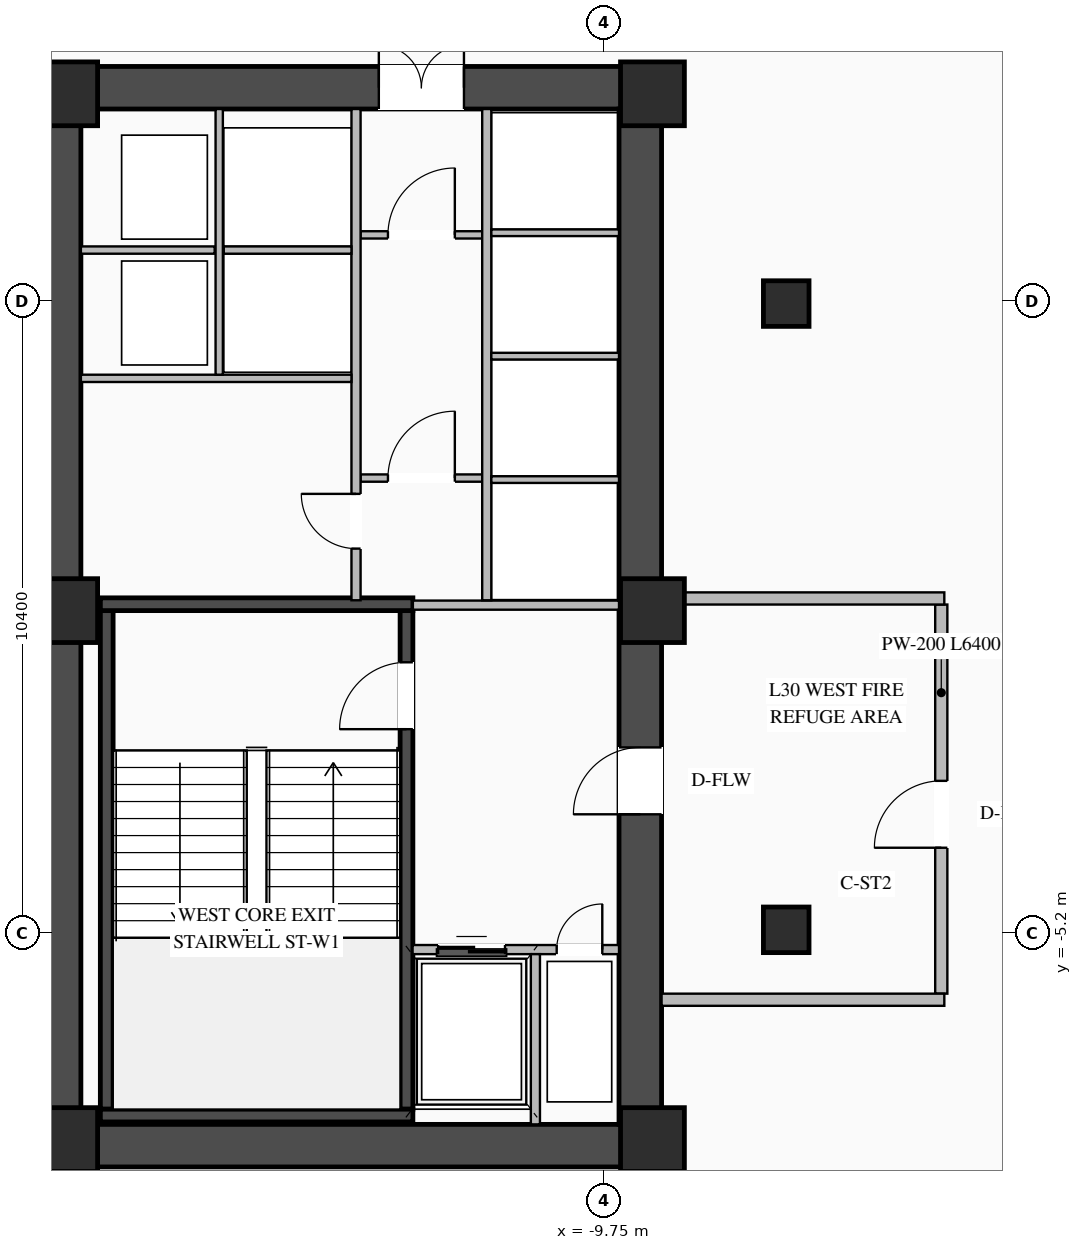
"""IFC4 building model, lengths in metres.
Left out: names, types, materials, properties, quantities, classifications, styles, units other than length and angle.
Written with IfcOpenShell. Run it as: python <this file> out.ifc"""

import sys

from ifc_helpers import new_model, si_unit, direction, frame, frame_2d, origin, origin_2d, place, context, subcontext, project, spatial, rectangle, i_section, extrude, element, fill, save


model = new_model("IFC4")
c1 = context("Model", 3, precision=1e-05, world=origin(), true_north=direction((0.0, 1.0)))
c2 = subcontext(c1, "Body", "Model", "MODEL_VIEW")
j1 = project(units=[si_unit("LENGTHUNIT", "METRE"), si_unit("PLANEANGLEUNIT", "RADIAN")], contexts=[c1])
p1 = place(None, origin())
s1 = spatial("IfcSite", under=j1, at=p1, CompositionType="ELEMENT")
p2 = place(p1, origin())
s2 = spatial("IfcBuilding", under=s1, at=p2, CompositionType="ELEMENT")
p3 = place(p2, frame((0.0, 0.0, 112.15)))
s3 = spatial("IfcBuildingStorey", under=s2, at=p3, CompositionType="ELEMENT", Elevation=112.15)
p4 = place(p3, frame((-19.05, -8.7, 0.0), z_axis=(0.0, 0.0, 1.0), x_axis=(1.0, 0.0, 0.0)))
e1 = element("IfcWall", 1, at=p4, inside=s3, PredefinedType="SHEAR", context=c2, shape_type="SweptSolid", body=[
    extrude(rectangle(XDim=10.25, YDim=0.7, at=frame_2d((5.125, 0.0))), origin(), (0.0, 0.0, 1.0), 4.22),
])
p5 = place(p3, frame((-19.05, 8.7, 0.0), z_axis=(0.0, 0.0, 1.0), x_axis=(1.0, 0.0, 0.0)))
e2 = element("IfcWall", 2, at=p5, inside=s3, PredefinedType="SHEAR", context=c2, shape_type="SweptSolid", body=[
    extrude(rectangle(XDim=10.25, YDim=0.7, at=frame_2d((5.125, 0.0))), origin(), (0.0, 0.0, 1.0), 4.22),
])
p6 = place(p5, frame((5.6, 0.0, 0.0)))
e3 = element("IfcOpeningElement", 3, at=p6, cuts=e2, PredefinedType="OPENING", context=c2, shape_type="SweptSolid", body=[
    extrude(rectangle(XDim=1.4, YDim=2.05, at=frame_2d((0.7, 1.025))), frame((0.0, 0.36, 0.0), z_axis=(0.0, -1.0, 0.0), x_axis=(1.0, 0.0, 0.0)), (0.0, 0.0, 1.0), 0.72),
])
p7 = place(p3, frame((-18.7, -8.35, 0.0), z_axis=(0.0, 0.0, 1.0), x_axis=(0.0, 1.0, 0.0)))
e4 = element("IfcWall", 4, at=p7, inside=s3, PredefinedType="SHEAR", context=c2, shape_type="SweptSolid", body=[
    extrude(rectangle(XDim=16.7, YDim=0.7, at=frame_2d((8.35, 0.0))), origin(), (0.0, 0.0, 1.0), 4.22),
])
p8 = place(p3, frame((-9.15, -8.35, 0.0), z_axis=(0.0, 0.0, 1.0), x_axis=(0.0, 1.0, 0.0)))
e5 = element("IfcWall", 5, at=p8, inside=s3, PredefinedType="SHEAR", context=c2, shape_type="SweptSolid", body=[
    extrude(rectangle(XDim=16.7, YDim=0.7, at=frame_2d((8.35, 0.0))), origin(), (0.0, 0.0, 1.0), 4.22),
])
p9 = place(p8, frame((5.1, 0.0, 0.0)))
e6 = element("IfcOpeningElement", 6, at=p9, cuts=e5, PredefinedType="OPENING", context=c2, shape_type="SweptSolid", body=[
    extrude(rectangle(XDim=1.1, YDim=2.08, at=frame_2d((0.55, 1.04))), frame((0.0, 0.36, 0.0), z_axis=(0.0, -1.0, 0.0), x_axis=(1.0, 0.0, 0.0)), (0.0, 0.0, 1.0), 0.72),
])
p10 = place(p3, frame((-12.995, -8.1, 0.0), z_axis=(0.0, 0.0, 1.0), x_axis=(0.0, 1.0, 0.0)))
e7 = element("IfcWall", 7, at=p10, inside=s3, PredefinedType="SHEAR", context=c2, shape_type="SweptSolid", body=[
    extrude(rectangle(XDim=8.2, YDim=0.21, at=frame_2d((4.1, 0.0))), origin(), (0.0, 0.0, 1.0), 4.22),
])
p11 = place(p10, frame((6.25, 0.0, 0.0)))
e8 = element("IfcOpeningElement", 8, at=p11, cuts=e7, PredefinedType="OPENING", context=c2, shape_type="SweptSolid", body=[
    extrude(rectangle(XDim=1.1, YDim=2.15, at=frame_2d((0.55, 1.075))), frame((0.0, 0.115, 0.0), z_axis=(0.0, -1.0, 0.0), x_axis=(1.0, 0.0, 0.0)), (0.0, 0.0, 1.0), 0.23),
])
p12 = place(p3, frame((-17.925, -8.1, 0.0), z_axis=(0.0, 0.0, 1.0), x_axis=(0.0, 1.0, 0.0)))
e9 = element("IfcWall", 9, at=p12, inside=s3, PredefinedType="SHEAR", context=c2, shape_type="SweptSolid", body=[
    extrude(rectangle(XDim=8.2, YDim=0.21, at=frame_2d((4.1, 0.0))), origin(), (0.0, 0.0, 1.0), 4.22),
])
for number, where, z_axis, x_axis in (
    (10, (-18.03, -8.205, 0.0), (0.0, 0.0, 1.0), (1.0, 0.0, 0.0)),
    (11, (-12.89, 0.205, 0.0), (0.0, 0.0, 1.0), (-1.0, 0.0, 0.0)),
):
    element("IfcWall", number, at=place(p3, frame(where, z_axis=z_axis, x_axis=x_axis)), inside=s3, PredefinedType="SHEAR", context=c2, shape_type="SweptSolid", body=[
        extrude(rectangle(XDim=5.14, YDim=0.21, at=frame_2d((2.57, 0.0))), origin(), (0.0, 0.0, 1.0), 4.22),
    ])
for number, where, z_axis, x_axis in (
    (12, (-8.95, -8.6, 0.0), (0.0, 0.0, 1.0), (1.0, 0.0, 0.0)),
    (13, (-8.95, 0.1, 0.0), (0.0, 0.0, 1.0), (1.0, 0.0, 0.0)),
    (14, (-8.95, 8.6, 0.0), (0.0, 0.0, 1.0), (1.0, 0.0, 0.0)),
    (15, (-18.6, -8.6, 0.0), (0.0, 0.0, 1.0), (1.0, 0.0, 0.0)),
    (16, (-18.6, 0.1, 0.0), (0.0, 0.0, 1.0), (1.0, 0.0, 0.0)),
    (17, (-18.6, 8.6, 0.0), (0.0, 0.0, 1.0), (1.0, 0.0, 0.0)),
):
    element("IfcColumn", number, at=place(p3, frame(where, z_axis=z_axis, x_axis=x_axis)), inside=s3, PredefinedType="COLUMN", context=c2, shape_type="SweptSolid", body=[
        extrude(rectangle(XDim=1.05, YDim=1.05, at=origin_2d()), origin(), (0.0, 0.0, 1.0), 4.5),
    ])
for number, where, z_axis, x_axis in (
    (18, (-6.75, -5.15, 0.0), (0.0, 0.0, 1.0), (1.0, 0.0, 0.0)),
    (19, (-6.75, 5.15, 0.0), (0.0, 0.0, 1.0), (1.0, 0.0, 0.0)),
):
    element("IfcColumn", number, at=place(p3, frame(where, z_axis=z_axis, x_axis=x_axis)), inside=s3, PredefinedType="COLUMN", context=c2, shape_type="SweptSolid", body=[
        extrude(i_section(OverallWidth=0.75, OverallDepth=0.75, WebThickness=0.03, FlangeThickness=0.044, at=origin_2d()), origin(), (0.0, 0.0, 1.0), 4.5),
    ])
p13 = place(p3, frame((-12.895, -5.475, 0.0), z_axis=(0.0, 0.0, 1.0), x_axis=(1.0, 0.0, 0.0)))
e20 = element("IfcWall", 20, at=p13, inside=s3, PredefinedType="STANDARD", context=c2, shape_type="SweptSolid", body=[
    extrude(rectangle(XDim=3.395, YDim=0.15, at=frame_2d((1.698, 0.0))), origin(), (0.0, 0.0, 1.0), 4.2),
])
p14 = place(p13, frame((0.42, 0.0, 0.0)))
e21 = element("IfcOpeningElement", 21, at=p14, cuts=e20, PredefinedType="OPENING", context=c2, shape_type="SweptSolid", body=[
    extrude(rectangle(XDim=1.1, YDim=2.15, at=frame_2d((0.55, 1.075))), frame((0.0, 0.085, 0.0), z_axis=(0.0, -1.0, 0.0), x_axis=(1.0, 0.0, 0.0)), (0.0, 0.0, 1.0), 0.17),
])
p15 = place(p13, frame((2.37, 0.0, 0.0)))
e22 = element("IfcOpeningElement", 22, at=p15, cuts=e20, PredefinedType="OPENING", context=c2, shape_type="SweptSolid", body=[
    extrude(rectangle(XDim=0.75, YDim=2.05, at=frame_2d((0.375, 1.025))), frame((0.0, 0.085, 0.0), z_axis=(0.0, -1.0, 0.0), x_axis=(1.0, 0.0, 0.0)), (0.0, 0.0, 1.0), 0.17),
])
p16 = place(p3, frame((-10.875, -8.35, 0.0), z_axis=(0.0, 0.0, 1.0), x_axis=(0.0, 1.0, 0.0)))
e23 = element("IfcWall", 23, at=p16, inside=s3, PredefinedType="STANDARD", context=c2, shape_type="SweptSolid", body=[
    extrude(rectangle(XDim=2.8, YDim=0.15, at=frame_2d((1.4, 0.0))), origin(), (0.0, 0.0, 1.0), 4.2),
])
p17 = place(p3, frame((-12.89, 0.19, 0.0), z_axis=(0.0, 0.0, 1.0), x_axis=(1.0, 0.0, 0.0)))
e24 = element("IfcWall", 24, at=p17, inside=s3, PredefinedType="STANDARD", context=c2, shape_type="SweptSolid", body=[
    extrude(rectangle(XDim=3.39, YDim=0.15, at=frame_2d((1.695, 0.0))), origin(), (0.0, 0.0, 1.0), 3.595),
])
p18 = place(p3, frame((-13.75, 2.28, 0.0), z_axis=(0.0, 0.0, 1.0), x_axis=(1.0, 0.0, 0.0)))
e25 = element("IfcWall", 25, at=p18, inside=s3, PredefinedType="STANDARD", context=c2, shape_type="SweptSolid", body=[
    extrude(rectangle(XDim=2.0, YDim=0.12, at=frame_2d((1.0, 0.0))), origin(), (0.0, 0.0, 1.0), 4.2),
])
p19 = place(p18, frame((0.45, 0.0, 0.0)))
e26 = element("IfcOpeningElement", 26, at=p19, cuts=e25, PredefinedType="OPENING", context=c2, shape_type="SweptSolid", body=[
    extrude(rectangle(XDim=1.1, YDim=2.1, at=frame_2d((0.55, 1.05))), frame((0.0, 0.07, 0.0), z_axis=(0.0, -1.0, 0.0), x_axis=(1.0, 0.0, 0.0)), (0.0, 0.0, 1.0), 0.14),
])
p20 = place(p3, frame((-13.75, 6.28, 0.0), z_axis=(0.0, 0.0, 1.0), x_axis=(1.0, 0.0, 0.0)))
e27 = element("IfcWall", 27, at=p20, inside=s3, PredefinedType="STANDARD", context=c2, shape_type="SweptSolid", body=[
    extrude(rectangle(XDim=2.0, YDim=0.12, at=frame_2d((1.0, 0.0))), origin(), (0.0, 0.0, 1.0), 4.2),
])
p21 = place(p20, frame((0.45, 0.0, 0.0)))
e28 = element("IfcOpeningElement", 28, at=p21, cuts=e27, PredefinedType="OPENING", context=c2, shape_type="SweptSolid", body=[
    extrude(rectangle(XDim=1.1, YDim=2.1, at=frame_2d((0.55, 1.05))), frame((0.0, 0.07, 0.0), z_axis=(0.0, -1.0, 0.0), x_axis=(1.0, 0.0, 0.0)), (0.0, 0.0, 1.0), 0.14),
])
p22 = place(p3, frame((-11.675, 0.27, 0.0), z_axis=(0.0, 0.0, 1.0), x_axis=(0.0, 1.0, 0.0)))
e29 = element("IfcWall", 29, at=p22, inside=s3, PredefinedType="STANDARD", context=c2, shape_type="SweptSolid", body=[
    extrude(rectangle(XDim=8.08, YDim=0.15, at=frame_2d((4.04, 0.0))), origin(), (0.0, 0.0, 1.0), 4.2),
])
for number, where, z_axis, x_axis in (
    (30, (-11.6, 2.255, 0.0), (0.0, 0.0, 1.0), (1.0, 0.0, 0.0)),
    (31, (-11.6, 4.285, 0.0), (0.0, 0.0, 1.0), (1.0, 0.0, 0.0)),
    (32, (-11.6, 6.315, 0.0), (0.0, 0.0, 1.0), (1.0, 0.0, 0.0)),
):
    element("IfcWall", number, at=place(p3, frame(where, z_axis=z_axis, x_axis=x_axis)), inside=s3, PredefinedType="STANDARD", context=c2, shape_type="SweptSolid", body=[
        extrude(rectangle(XDim=2.1, YDim=0.11, at=frame_2d((1.05, 0.0))), origin(), (0.0, 0.0, 1.0), 4.2),
    ])
p23 = place(p3, frame((-13.825, 0.27, 0.0), z_axis=(0.0, 0.0, 1.0), x_axis=(0.0, 1.0, 0.0)))
e33 = element("IfcWall", 33, at=p23, inside=s3, PredefinedType="STANDARD", context=c2, shape_type="SweptSolid", body=[
    extrude(rectangle(XDim=8.08, YDim=0.15, at=frame_2d((4.04, 0.0))), origin(), (0.0, 0.0, 1.0), 4.2),
])
p24 = place(p23, frame((0.85, 0.0, 0.0)))
e34 = element("IfcOpeningElement", 34, at=p24, cuts=e33, PredefinedType="OPENING", context=c2, shape_type="SweptSolid", body=[
    extrude(rectangle(XDim=0.9, YDim=2.05, at=frame_2d((0.45, 1.025))), frame((0.0, 0.085, 0.0), z_axis=(0.0, -1.0, 0.0), x_axis=(1.0, 0.0, 0.0)), (0.0, 0.0, 1.0), 0.17),
])
p25 = place(p3, frame((-18.35, 3.92, 0.0), z_axis=(0.0, 0.0, 1.0), x_axis=(1.0, 0.0, 0.0)))
e35 = element("IfcWall", 35, at=p25, inside=s3, PredefinedType="STANDARD", context=c2, shape_type="SweptSolid", body=[
    extrude(rectangle(XDim=4.45, YDim=0.12, at=frame_2d((2.225, 0.0))), origin(), (0.0, 0.0, 1.0), 4.2),
])
p26 = place(p3, frame((-18.35, 6.03, 0.0), z_axis=(0.0, 0.0, 1.0), x_axis=(1.0, 0.0, 0.0)))
e36 = element("IfcWall", 36, at=p26, inside=s3, PredefinedType="STANDARD", context=c2, shape_type="SweptSolid", body=[
    extrude(rectangle(XDim=2.2, YDim=0.12, at=frame_2d((1.1, 0.0))), origin(), (0.0, 0.0, 1.0), 4.2),
])
p27 = place(p3, frame((-16.075, 3.98, 0.0), z_axis=(0.0, 0.0, 1.0), x_axis=(0.0, 1.0, 0.0)))
e37 = element("IfcWall", 37, at=p27, inside=s3, PredefinedType="STANDARD", context=c2, shape_type="SweptSolid", body=[
    extrude(rectangle(XDim=4.37, YDim=0.12, at=frame_2d((2.185, 0.0))), origin(), (0.0, 0.0, 1.0), 4.2),
])
p28 = place(p3, frame((-16.0, 6.03, 0.0), z_axis=(0.0, 0.0, 1.0), x_axis=(1.0, 0.0, 0.0)))
e38 = element("IfcWall", 38, at=p28, inside=s3, PredefinedType="STANDARD", context=c2, shape_type="SweptSolid", body=[
    extrude(rectangle(XDim=2.1, YDim=0.12, at=frame_2d((1.05, 0.0))), origin(), (0.0, 0.0, 1.0), 4.2),
])
p29 = place(p3, frame((-4.2, -6.2, 0.0), z_axis=(0.0, 0.0, 1.0), x_axis=(0.0, 1.0, 0.0)))
e39 = element("IfcWall", 39, at=p29, inside=s3, PredefinedType="STANDARD", context=c2, shape_type="SweptSolid", body=[
    extrude(rectangle(XDim=6.4, YDim=0.2, at=frame_2d((3.2, 0.0))), origin(), (0.0, 0.0, 1.0), 4.2),
])
p30 = place(p29, frame((2.4, 0.0, 0.0)))
e40 = element("IfcOpeningElement", 40, at=p30, cuts=e39, PredefinedType="OPENING", context=c2, shape_type="SweptSolid", body=[
    extrude(rectangle(XDim=1.1, YDim=2.08, at=frame_2d((0.55, 1.04))), frame((0.0, 0.11, 0.0), z_axis=(0.0, -1.0, 0.0), x_axis=(1.0, 0.0, 0.0)), (0.0, 0.0, 1.0), 0.22),
])
for number, where, z_axis, x_axis in (
    (41, (-8.8, -6.3, 0.0), (0.0, 0.0, 1.0), (1.0, 0.0, 0.0)),
    (42, (-8.8, 0.3, 0.0), (0.0, 0.0, 1.0), (1.0, 0.0, 0.0)),
):
    element("IfcWall", number, at=place(p3, frame(where, z_axis=z_axis, x_axis=x_axis)), inside=s3, PredefinedType="STANDARD", context=c2, shape_type="SweptSolid", body=[
        extrude(rectangle(XDim=4.65, YDim=0.2, at=frame_2d((2.325, 0.0))), origin(), (0.0, 0.0, 1.0), 4.2),
    ])
p31 = place(p11, origin())
e43 = element("IfcDoor", 43, at=p31, inside=s3, OperationType="SINGLE_SWING_LEFT", PredefinedType="DOOR", context=c2, shape_type="SweptSolid", body=[
    extrude(rectangle(XDim=1.1, YDim=2.15, at=frame_2d((0.55, 1.075))), frame((0.0, 0.025, 0.0), z_axis=(0.0, -1.0, 0.0), x_axis=(1.0, 0.0, 0.0)), (0.0, 0.0, 1.0), 0.05),
])
fill(e8, e43)
p32 = place(p14, origin())
e44 = element("IfcDoor", 44, at=p32, inside=s3, OperationType="DOUBLE_DOOR_SLIDING", PredefinedType="DOOR", context=c2, shape_type="SweptSolid", body=[
    extrude(rectangle(XDim=1.1, YDim=2.15, at=frame_2d((0.55, 1.075))), frame((0.0, 0.025, 0.0), z_axis=(0.0, -1.0, 0.0), x_axis=(1.0, 0.0, 0.0)), (0.0, 0.0, 1.0), 0.05),
])
fill(e21, e44)
p33 = place(p15, origin())
e45 = element("IfcDoor", 45, at=p33, inside=s3, OperationType="SINGLE_SWING_RIGHT", PredefinedType="DOOR", context=c2, shape_type="SweptSolid", body=[
    extrude(rectangle(XDim=0.75, YDim=2.05, at=frame_2d((0.375, 1.025))), frame((0.0, 0.025, 0.0), z_axis=(0.0, -1.0, 0.0), x_axis=(1.0, 0.0, 0.0)), (0.0, 0.0, 1.0), 0.05),
])
fill(e22, e45)
p34 = place(p9, origin())
e46 = element("IfcDoor", 46, at=p34, inside=s3, OperationType="SINGLE_SWING_LEFT", PredefinedType="DOOR", context=c2, shape_type="SweptSolid", body=[
    extrude(rectangle(XDim=1.1, YDim=2.08, at=frame_2d((0.55, 1.04))), frame((0.0, 0.305, 0.0), z_axis=(0.0, -1.0, 0.0), x_axis=(1.0, 0.0, 0.0)), (0.0, 0.0, 1.0), 0.05),
])
fill(e6, e46)
p35 = place(p19, origin())
e47 = element("IfcDoor", 47, at=p35, inside=s3, OperationType="SINGLE_SWING_RIGHT", PredefinedType="DOOR", context=c2, shape_type="SweptSolid", body=[
    extrude(rectangle(XDim=1.1, YDim=2.1, at=frame_2d((0.55, 1.05))), frame((0.0, 0.025, 0.0), z_axis=(0.0, -1.0, 0.0), x_axis=(1.0, 0.0, 0.0)), (0.0, 0.0, 1.0), 0.05),
])
fill(e26, e47)
p36 = place(p21, origin())
e48 = element("IfcDoor", 48, at=p36, inside=s3, OperationType="SINGLE_SWING_RIGHT", PredefinedType="DOOR", context=c2, shape_type="SweptSolid", body=[
    extrude(rectangle(XDim=1.1, YDim=2.1, at=frame_2d((0.55, 1.05))), frame((0.0, 0.025, 0.0), z_axis=(0.0, -1.0, 0.0), x_axis=(1.0, 0.0, 0.0)), (0.0, 0.0, 1.0), 0.05),
])
fill(e28, e48)
p37 = place(p6, origin())
e49 = element("IfcDoor", 49, at=p37, inside=s3, OperationType="DOUBLE_DOOR_SINGLE_SWING", PredefinedType="DOOR", context=c2, shape_type="SweptSolid", body=[
    extrude(rectangle(XDim=1.4, YDim=2.05, at=frame_2d((0.7, 1.025))), frame((0.0, 0.295, 0.0), z_axis=(0.0, -1.0, 0.0), x_axis=(1.0, 0.0, 0.0)), (0.0, 0.0, 1.0), 0.05),
])
fill(e3, e49)
p38 = place(p24, origin())
e50 = element("IfcDoor", 50, at=p38, inside=s3, OperationType="SINGLE_SWING_RIGHT", PredefinedType="DOOR", context=c2, shape_type="SweptSolid", body=[
    extrude(rectangle(XDim=0.9, YDim=2.05, at=frame_2d((0.45, 1.025))), frame((0.0, 0.025, 0.0), z_axis=(0.0, -1.0, 0.0), x_axis=(1.0, 0.0, 0.0)), (0.0, 0.0, 1.0), 0.05),
])
fill(e34, e50)
p39 = place(p30, origin())
e51 = element("IfcDoor", 51, at=p39, inside=s3, OperationType="SINGLE_SWING_LEFT", PredefinedType="DOOR", context=c2, shape_type="SweptSolid", body=[
    extrude(rectangle(XDim=1.1, YDim=2.08, at=frame_2d((0.55, 1.04))), frame((0.0, 0.025, 0.0), z_axis=(0.0, -1.0, 0.0), x_axis=(1.0, 0.0, 0.0)), (0.0, 0.0, 1.0), 0.05),
])
fill(e40, e51)
save(model, sys.argv[1])
